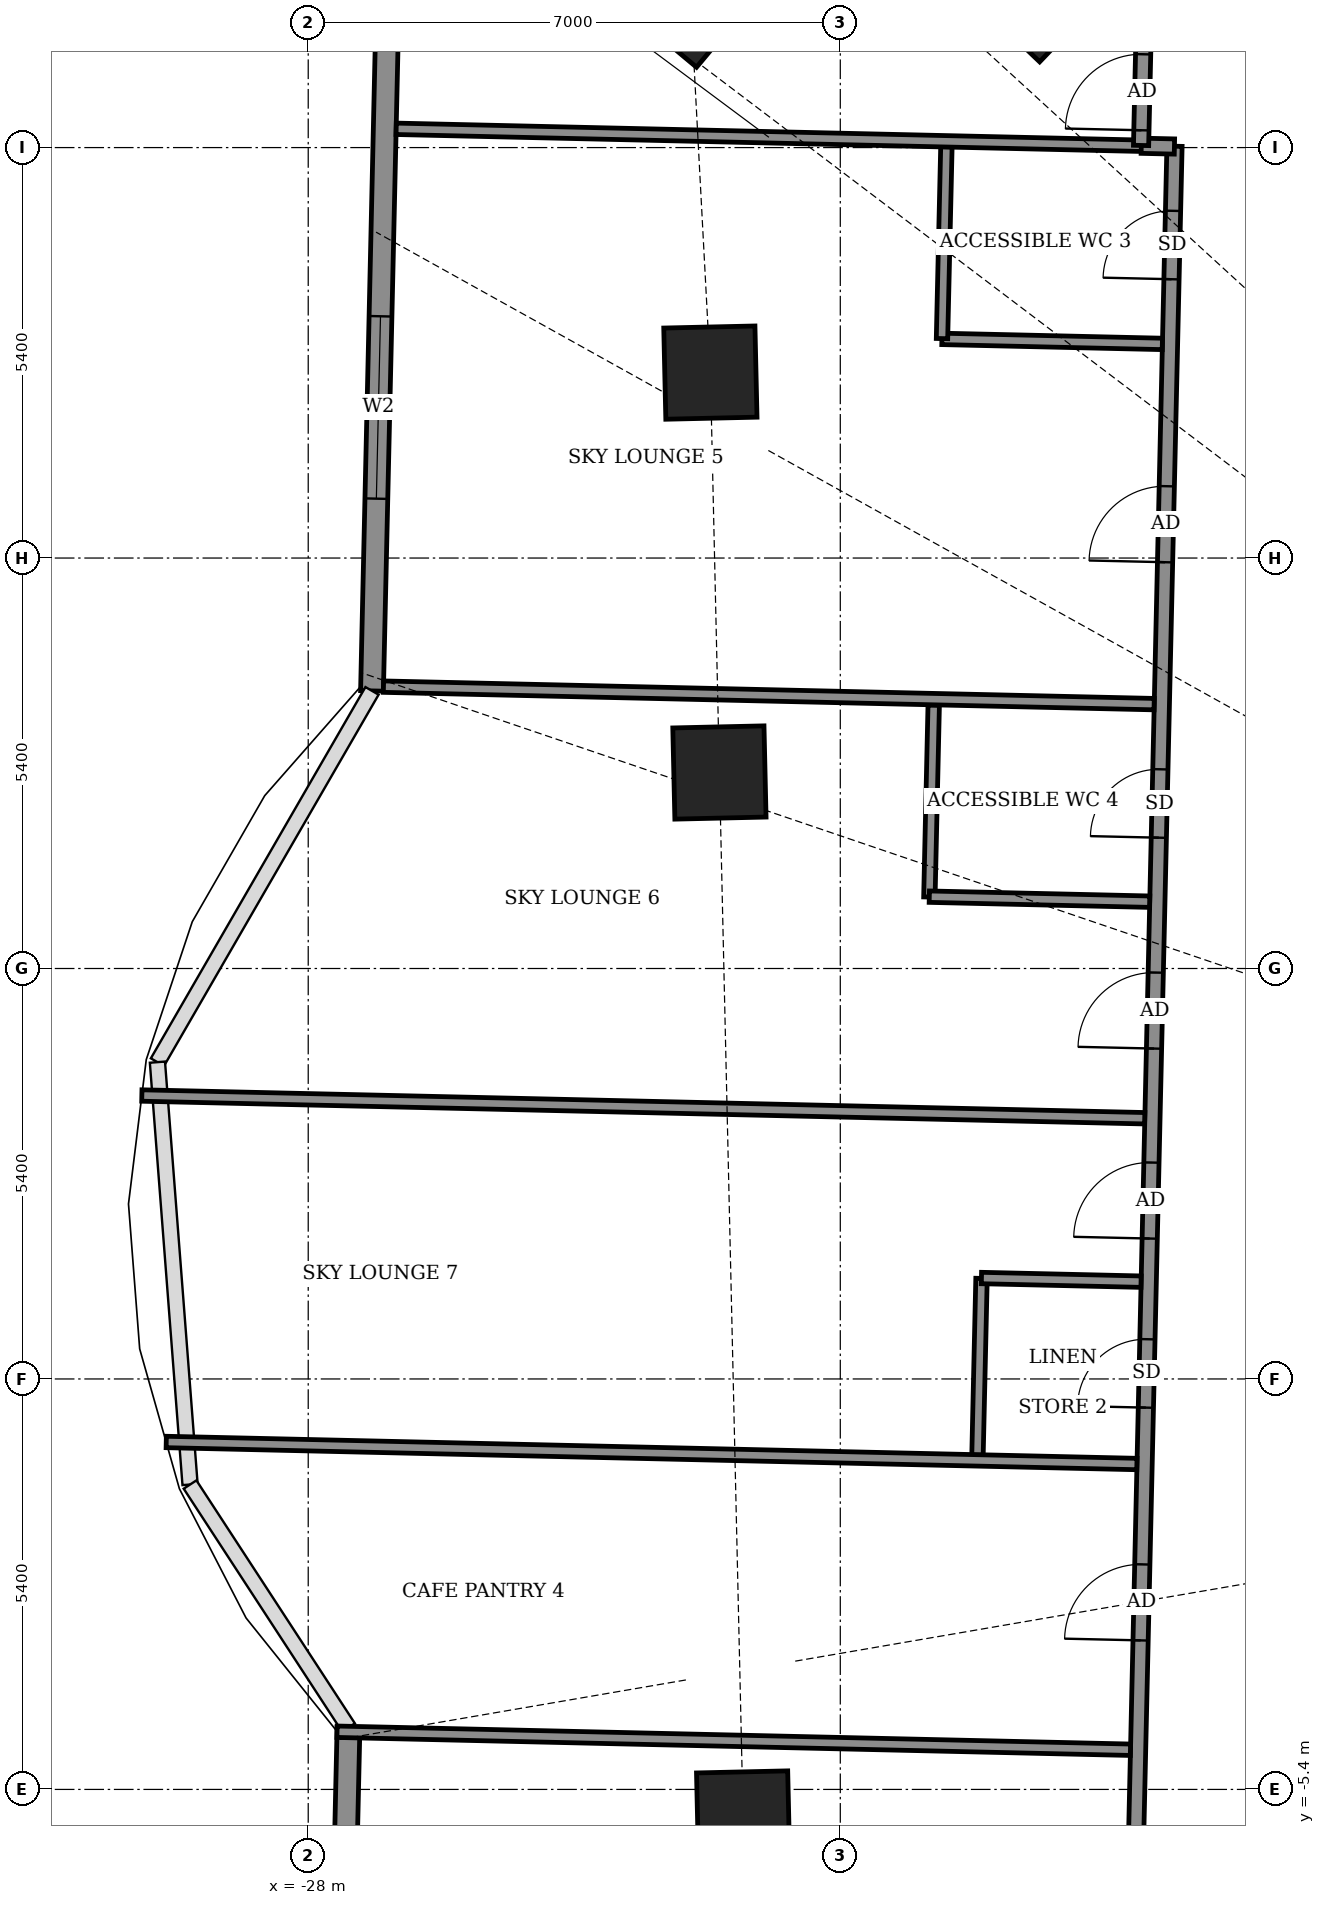
"""IFC4 building model, lengths in metres.
Left out: names, types, materials, properties, quantities, classifications, styles, units other than length and angle.
Written with IfcOpenShell. Run it as: python <this file> out.ifc"""

import sys

from ifc_helpers import new_model, si_unit, direction, frame, frame_2d, origin, origin_2d, place, context, subcontext, project, spatial, rectangle, extrude, element, fill, save


model = new_model("IFC4")
c1 = context("Model", 3, precision=1e-05, world=origin(), true_north=direction((0.0, 1.0)))
c2 = subcontext(c1, "Body", "Model", "MODEL_VIEW")
j1 = project(units=[si_unit("LENGTHUNIT", "METRE"), si_unit("PLANEANGLEUNIT", "RADIAN")], contexts=[c1])
p1 = place(None, origin())
s1 = spatial("IfcSite", under=j1, at=p1, CompositionType="ELEMENT")
p2 = place(p1, origin())
s2 = spatial("IfcBuilding", under=s1, at=p2, CompositionType="ELEMENT")
p3 = place(p2, frame((0.0, 0.0, 193.3)))
s3 = spatial("IfcBuildingStorey", under=s2, at=p3, CompositionType="ELEMENT", Elevation=193.3)
for number, where, z_axis, x_axis in (
    (1, (-22.278, -5.769, -0.55), (0.0, 0.0, 1.0), (0.023, -1.0, 0.0)),
    (2, (-18.396, 18.177, -0.55), (0.0, 0.0, 1.0), (-0.691, -0.723, 0.0)),
    (3, (-22.968, 18.103, -0.55), (0.0, 0.0, 1.0), (-0.641, -0.768, 0.0)),
    (4, (-22.709, 13.24, -0.55), (0.0, 0.0, 1.0), (0.023, -1.0, 0.0)),
    (5, (-22.59, 7.979, -0.55), (0.0, 0.0, 1.0), (0.023, -1.0, 0.0)),
):
    element("IfcColumn", number, at=place(p3, frame(where, z_axis=z_axis, x_axis=x_axis)), inside=s3, PredefinedType="COLUMN", context=c2, shape_type="SweptSolid", body=[
        extrude(rectangle(XDim=1.2, YDim=1.2, at=origin_2d()), origin(), (0.0, 0.0, 1.0), 4.6),
    ])
p4 = place(p3, frame((-26.904, 20.379, 0.0), z_axis=(0.0, 0.0, 1.0), x_axis=(-0.022669030322, -0.999743024514, 0.0)))
e6 = element("IfcWall", 6, at=p4, inside=s3, PredefinedType="SOLIDWALL", context=c2, shape_type="SweptSolid", body=[
    extrude(rectangle(XDim=11.33, YDim=0.3, at=frame_2d((5.665, 0.0))), origin(), (0.0, 0.0, 1.0), 2.85),
])
p5 = place(p4, frame((1.138, 0.0, 0.0)))
e7 = element("IfcOpeningElement", 7, at=p5, cuts=e6, PredefinedType="OPENING", context=c2, shape_type="SweptSolid", body=[
    extrude(rectangle(XDim=1.5, YDim=2.4, at=frame_2d((0.75, 1.2))), frame((0.0, 0.16, 0.0), z_axis=(0.0, -1.0, 0.0), x_axis=(1.0, 0.0, 0.0)), (0.0, 0.0, 1.0), 0.32),
])
p6 = place(p4, frame((6.4, 0.0, 0.9)))
e8 = element("IfcOpeningElement", 8, at=p6, cuts=e6, PredefinedType="OPENING", context=c2, shape_type="SweptSolid", body=[
    extrude(rectangle(XDim=2.4, YDim=1.5, at=frame_2d((1.2, 0.75))), frame((0.0, 0.16, 0.0), z_axis=(0.0, -1.0, 0.0), x_axis=(1.0, 0.0, 0.0)), (0.0, 0.0, 1.0), 0.32),
])
p7 = place(p3, frame((-27.47, -4.585, 0.0), z_axis=(0.0, 0.0, 1.0), x_axis=(-0.022686419344, -0.999742630069, 0.0)))
e9 = element("IfcWall", 9, at=p7, inside=s3, PredefinedType="SOLIDWALL", context=c2, shape_type="SweptSolid", body=[
    extrude(rectangle(XDim=11.73, YDim=0.3, at=frame_2d((5.865, 0.0))), origin(), (0.0, 0.0, 1.0), 2.85),
])
p8 = place(p7, frame((2.942, 0.0, 0.0)))
e10 = element("IfcOpeningElement", 10, at=p8, cuts=e9, PredefinedType="OPENING", context=c2, shape_type="SweptSolid", body=[
    extrude(rectangle(XDim=1.5, YDim=2.4, at=frame_2d((0.75, 1.2))), frame((0.0, 0.16, 0.0), z_axis=(0.0, -1.0, 0.0), x_axis=(1.0, 0.0, 0.0)), (0.0, 0.0, 1.0), 0.32),
])
p9 = place(p7, frame((7.629, 0.0, 0.9)))
e11 = element("IfcOpeningElement", 11, at=p9, cuts=e9, PredefinedType="OPENING", context=c2, shape_type="SweptSolid", body=[
    extrude(rectangle(XDim=0.9, YDim=1.5, at=frame_2d((0.45, 0.75))), frame((0.0, 0.16, 0.0), z_axis=(0.0, -1.0, 0.0), x_axis=(1.0, 0.0, 0.0)), (0.0, 0.0, 1.0), 0.32),
])
p10 = place(p7, frame((9.151, 0.0, 0.9)))
e12 = element("IfcOpeningElement", 12, at=p10, cuts=e9, PredefinedType="OPENING", context=c2, shape_type="SweptSolid", body=[
    extrude(rectangle(XDim=1.2, YDim=1.5, at=frame_2d((0.6, 0.75))), frame((0.0, 0.16, 0.0), z_axis=(0.0, -1.0, 0.0), x_axis=(1.0, 0.0, 0.0)), (0.0, 0.0, 1.0), 0.32),
])
p11 = place(p3, frame((-17.247, -12.149, 0.0), z_axis=(0.0, 0.0, 1.0), x_axis=(0.022698146637, 0.999742363881, 0.0)))
e13 = element("IfcWall", 13, at=p11, inside=s3, PredefinedType="PARTITIONING", context=c2, shape_type="SweptSolid", body=[
    extrude(rectangle(XDim=28.374, YDim=0.2, at=frame_2d((14.187, 0.0))), origin(), (0.0, 0.0, 1.0), 2.85),
])
p12 = place(p11, frame((22.9, 0.0, 0.0)))
e14 = element("IfcOpeningElement", 14, at=p12, cuts=e13, PredefinedType="OPENING", context=c2, shape_type="SweptSolid", body=[
    extrude(rectangle(XDim=1.0, YDim=2.1, at=frame_2d((0.5, 1.05))), frame((0.0, 0.11, 0.0), z_axis=(0.0, -1.0, 0.0), x_axis=(1.0, 0.0, 0.0)), (0.0, 0.0, 1.0), 0.22),
])
p13 = place(p11, frame((26.624, 0.0, 0.0)))
e15 = element("IfcOpeningElement", 15, at=p13, cuts=e13, PredefinedType="OPENING", context=c2, shape_type="SweptSolid", body=[
    extrude(rectangle(XDim=0.9, YDim=2.1, at=frame_2d((0.45, 1.05))), frame((0.0, 0.11, 0.0), z_axis=(0.0, -1.0, 0.0), x_axis=(1.0, 0.0, 0.0)), (0.0, 0.0, 1.0), 0.22),
])
p14 = place(p11, frame((16.5, 0.0, 0.0)))
e16 = element("IfcOpeningElement", 16, at=p14, cuts=e13, PredefinedType="OPENING", context=c2, shape_type="SweptSolid", body=[
    extrude(rectangle(XDim=1.0, YDim=2.1, at=frame_2d((0.5, 1.05))), frame((0.0, 0.11, 0.0), z_axis=(0.0, -1.0, 0.0), x_axis=(1.0, 0.0, 0.0)), (0.0, 0.0, 1.0), 0.22),
])
p15 = place(p11, frame((19.275, 0.0, 0.0)))
e17 = element("IfcOpeningElement", 17, at=p15, cuts=e13, PredefinedType="OPENING", context=c2, shape_type="SweptSolid", body=[
    extrude(rectangle(XDim=0.9, YDim=2.1, at=frame_2d((0.45, 1.05))), frame((0.0, 0.11, 0.0), z_axis=(0.0, -1.0, 0.0), x_axis=(1.0, 0.0, 0.0)), (0.0, 0.0, 1.0), 0.22),
])
p16 = place(p11, frame((14.0, 0.0, 0.0)))
e18 = element("IfcOpeningElement", 18, at=p16, cuts=e13, PredefinedType="OPENING", context=c2, shape_type="SweptSolid", body=[
    extrude(rectangle(XDim=1.0, YDim=2.1, at=frame_2d((0.5, 1.05))), frame((0.0, 0.11, 0.0), z_axis=(0.0, -1.0, 0.0), x_axis=(1.0, 0.0, 0.0)), (0.0, 0.0, 1.0), 0.22),
])
p17 = place(p11, frame((11.775, 0.0, 0.0)))
e19 = element("IfcOpeningElement", 19, at=p17, cuts=e13, PredefinedType="OPENING", context=c2, shape_type="SweptSolid", body=[
    extrude(rectangle(XDim=0.9, YDim=2.1, at=frame_2d((0.45, 1.05))), frame((0.0, 0.11, 0.0), z_axis=(0.0, -1.0, 0.0), x_axis=(1.0, 0.0, 0.0)), (0.0, 0.0, 1.0), 0.22),
])
p18 = place(p11, frame((8.712, 0.0, 0.0)))
e20 = element("IfcOpeningElement", 20, at=p18, cuts=e13, PredefinedType="OPENING", context=c2, shape_type="SweptSolid", body=[
    extrude(rectangle(XDim=1.0, YDim=2.1, at=frame_2d((0.5, 1.05))), frame((0.0, 0.11, 0.0), z_axis=(0.0, -1.0, 0.0), x_axis=(1.0, 0.0, 0.0)), (0.0, 0.0, 1.0), 0.22),
])
p19 = place(p11, frame((3.138, 0.0, 0.0)))
e21 = element("IfcOpeningElement", 21, at=p19, cuts=e13, PredefinedType="OPENING", context=c2, shape_type="SweptSolid", body=[
    extrude(rectangle(XDim=1.0, YDim=2.1, at=frame_2d((0.5, 1.05))), frame((0.0, 0.11, 0.0), z_axis=(0.0, -1.0, 0.0), x_axis=(1.0, 0.0, 0.0)), (0.0, 0.0, 1.0), 0.22),
])
p20 = place(p3, frame((-27.621, -4.641, 0.0), z_axis=(0.0, 0.0, 1.0), x_axis=(0.999742728106, -0.022682098664, 0.0)))
e22 = element("IfcWall", 22, at=p20, inside=s3, PredefinedType="PARTITIONING", context=c2, shape_type="SweptSolid", body=[
    extrude(rectangle(XDim=10.441, YDim=0.15, at=frame_2d((5.22, 0.0))), origin(), (0.0, 0.0, 1.0), 2.65),
])
p21 = place(p3, frame((-19.195, -1.002, 0.0), z_axis=(0.0, 0.0, 1.0), x_axis=(0.022781023197, 0.999740478815, 0.0)))
e23 = element("IfcWall", 23, at=p21, inside=s3, PredefinedType="PARTITIONING", context=c2, shape_type="SweptSolid", body=[
    extrude(rectangle(XDim=2.325, YDim=0.15, at=frame_2d((1.163, 0.0))), origin(), (0.0, 0.0, 1.0), 4.05),
])
p22 = place(p3, frame((-29.868, -0.829, 0.0), z_axis=(0.0, 0.0, 1.0), x_axis=(0.999742604636, -0.022687540085, 0.0)))
e24 = element("IfcWall", 24, at=p22, inside=s3, PredefinedType="PARTITIONING", context=c2, shape_type="SweptSolid", body=[
    extrude(rectangle(XDim=12.773, YDim=0.15, at=frame_2d((6.387, 0.0))), origin(), (0.0, 0.0, 1.0), 0.93),
])
p23 = place(p3, frame((-19.143, 1.328, 0.0), z_axis=(0.0, 0.0, 1.0), x_axis=(0.999740513837, -0.022779486249, 0.0)))
e25 = element("IfcWall", 25, at=p23, inside=s3, PredefinedType="PARTITIONING", context=c2, shape_type="SweptSolid", body=[
    extrude(rectangle(XDim=2.101, YDim=0.15, at=frame_2d((1.05, 0.0))), origin(), (0.0, 0.0, 1.0), 4.05),
])
p24 = place(p3, frame((-30.189, 3.729, 0.0), z_axis=(0.0, 0.0, 1.0), x_axis=(0.999743189939, -0.022661733609, 0.0)))
e26 = element("IfcWall", 26, at=p24, inside=s3, PredefinedType="PARTITIONING", context=c2, shape_type="SweptSolid", body=[
    extrude(rectangle(XDim=13.197, YDim=0.15, at=frame_2d((6.599, 0.0))), origin(), (0.0, 0.0, 1.0), 0.93),
])
p25 = place(p3, frame((-19.828, 6.34, 0.0), z_axis=(0.0, 0.0, 1.0), x_axis=(0.022532486354, 0.9997461113, 0.0)))
e27 = element("IfcWall", 27, at=p25, inside=s3, PredefinedType="PARTITIONING", context=c2, shape_type="SweptSolid", body=[
    extrude(rectangle(XDim=2.525, YDim=0.15, at=frame_2d((1.262, 0.0))), origin(), (0.0, 0.0, 1.0), 2.85),
])
p26 = place(p3, frame((-19.829, 6.345, 0.0), z_axis=(0.0, 0.0, 1.0), x_axis=(0.999741618182, -0.022730967319, 0.0)))
e28 = element("IfcWall", 28, at=p26, inside=s3, PredefinedType="PARTITIONING", context=c2, shape_type="SweptSolid", body=[
    extrude(rectangle(XDim=2.9, YDim=0.15, at=frame_2d((1.45, 0.0))), origin(), (0.0, 0.0, 1.0), 2.85),
])
p27 = place(p3, frame((-27.01, 9.108, 0.0), z_axis=(0.0, 0.0, 1.0), x_axis=(0.999742841246, -0.022677111331, 0.0)))
e29 = element("IfcWall", 29, at=p27, inside=s3, PredefinedType="PARTITIONING", context=c2, shape_type="SweptSolid", body=[
    extrude(rectangle(XDim=10.142, YDim=0.15, at=frame_2d((5.071, 0.0))), origin(), (0.0, 0.0, 1.0), 2.65),
])
p28 = place(p3, frame((-19.663, 13.683, 0.0), z_axis=(0.0, 0.0, 1.0), x_axis=(0.999739876649, -0.022807433839, 0.0)))
e30 = element("IfcWall", 30, at=p28, inside=s3, PredefinedType="PARTITIONING", context=c2, shape_type="SweptSolid", body=[
    extrude(rectangle(XDim=2.901, YDim=0.15, at=frame_2d((1.45, 0.0))), origin(), (0.0, 0.0, 1.0), 2.85),
])
p29 = place(p3, frame((-19.662, 13.687, 0.0), z_axis=(0.0, 0.0, 1.0), x_axis=(0.023015762656, 0.999735102249, 0.0)))
e31 = element("IfcWall", 31, at=p29, inside=s3, PredefinedType="PARTITIONING", context=c2, shape_type="SweptSolid", body=[
    extrude(rectangle(XDim=2.525, YDim=0.15, at=frame_2d((1.262, 0.0))), origin(), (0.0, 0.0, 1.0), 2.85),
])
p30 = place(p3, frame((-26.843, 16.447, 0.0), z_axis=(0.0, 0.0, 1.0), x_axis=(0.999741809847, -0.022722536032, 0.0)))
e32 = element("IfcWall", 32, at=p30, inside=s3, PredefinedType="PARTITIONING", context=c2, shape_type="SweptSolid", body=[
    extrude(rectangle(XDim=9.81, YDim=0.15, at=frame_2d((4.905, 0.0))), origin(), (0.0, 0.0, 1.0), 2.65),
])
p31 = place(p3, frame((-17.04, 16.224, 0.0), z_axis=(0.0, 0.0, 1.0), x_axis=(0.999736607625, -0.022950280466, 0.0)))
e33 = element("IfcWall", 33, at=p31, inside=s3, PredefinedType="PARTITIONING", context=c2, shape_type="SweptSolid", body=[
    extrude(rectangle(XDim=0.436, YDim=0.2, at=frame_2d((0.218, 0.0))), origin(), (0.0, 0.0, 1.0), 2.85),
])
p32 = place(p3, frame((-17.043, 16.228, 0.0), z_axis=(0.0, 0.0, 1.0), x_axis=(0.022617910375, 0.999744182344, 0.0)))
e34 = element("IfcWall", 34, at=p32, inside=s3, PredefinedType="PARTITIONING", context=c2, shape_type="SweptSolid", body=[
    extrude(rectangle(XDim=1.5, YDim=0.2, at=frame_2d((0.75, 0.0))), origin(), (0.0, 0.0, 1.0), 2.85),
])
p33 = place(p32, frame((0.2, 0.0, 0.0)))
e35 = element("IfcOpeningElement", 35, at=p33, cuts=e34, PredefinedType="OPENING", context=c2, shape_type="SweptSolid", body=[
    extrude(rectangle(XDim=1.0, YDim=2.1, at=frame_2d((0.5, 1.05))), frame((0.0, 0.11, 0.0), z_axis=(0.0, -1.0, 0.0), x_axis=(1.0, 0.0, 0.0)), (0.0, 0.0, 1.0), 0.22),
])
p34 = place(p6, origin())
e36 = element("IfcWindow", 36, at=p34, inside=s3, PartitioningType="DOUBLE_PANEL_VERTICAL", PredefinedType="WINDOW", context=c2, shape_type="SweptSolid", body=[
    extrude(rectangle(XDim=2.4, YDim=1.5, at=frame_2d((1.2, 0.75))), frame((0.0, 0.03, 0.0), z_axis=(0.0, -1.0, 0.0), x_axis=(1.0, 0.0, 0.0)), (0.0, 0.0, 1.0), 0.06),
])
fill(e8, e36)
p35 = place(p33, origin())
e37 = element("IfcDoor", 37, at=p35, inside=s3, OperationType="SINGLE_SWING_LEFT", PredefinedType="DOOR", context=c2, shape_type="SweptSolid", body=[
    extrude(rectangle(XDim=1.0, YDim=2.1, at=frame_2d((0.5, 1.05))), frame((0.0, 0.025, 0.0), z_axis=(0.0, -1.0, 0.0), x_axis=(1.0, 0.0, 0.0)), (0.0, 0.0, 1.0), 0.05),
])
fill(e35, e37)
p36 = place(p12, origin())
e38 = element("IfcDoor", 38, at=p36, inside=s3, OperationType="SINGLE_SWING_RIGHT", PredefinedType="DOOR", context=c2, shape_type="SweptSolid", body=[
    extrude(rectangle(XDim=1.0, YDim=2.1, at=frame_2d((0.5, 1.05))), frame((0.0, 0.025, 0.0), z_axis=(0.0, -1.0, 0.0), x_axis=(1.0, 0.0, 0.0)), (0.0, 0.0, 1.0), 0.05),
])
fill(e14, e38)
p37 = place(p13, origin())
e39 = element("IfcDoor", 39, at=p37, inside=s3, OperationType="SINGLE_SWING_LEFT", PredefinedType="DOOR", context=c2, shape_type="SweptSolid", body=[
    extrude(rectangle(XDim=0.9, YDim=2.1, at=frame_2d((0.45, 1.05))), frame((0.0, 0.025, 0.0), z_axis=(0.0, -1.0, 0.0), x_axis=(1.0, 0.0, 0.0)), (0.0, 0.0, 1.0), 0.05),
])
fill(e15, e39)
p38 = place(p14, origin())
e40 = element("IfcDoor", 40, at=p38, inside=s3, OperationType="SINGLE_SWING_LEFT", PredefinedType="DOOR", context=c2, shape_type="SweptSolid", body=[
    extrude(rectangle(XDim=1.0, YDim=2.1, at=frame_2d((0.5, 1.05))), frame((0.0, 0.025, 0.0), z_axis=(0.0, -1.0, 0.0), x_axis=(1.0, 0.0, 0.0)), (0.0, 0.0, 1.0), 0.05),
])
fill(e16, e40)
p39 = place(p15, origin())
e41 = element("IfcDoor", 41, at=p39, inside=s3, OperationType="SINGLE_SWING_RIGHT", PredefinedType="DOOR", context=c2, shape_type="SweptSolid", body=[
    extrude(rectangle(XDim=0.9, YDim=2.1, at=frame_2d((0.45, 1.05))), frame((0.0, 0.025, 0.0), z_axis=(0.0, -1.0, 0.0), x_axis=(1.0, 0.0, 0.0)), (0.0, 0.0, 1.0), 0.05),
])
fill(e17, e41)
p40 = place(p16, origin())
e42 = element("IfcDoor", 42, at=p40, inside=s3, OperationType="SINGLE_SWING_RIGHT", PredefinedType="DOOR", context=c2, shape_type="SweptSolid", body=[
    extrude(rectangle(XDim=1.0, YDim=2.1, at=frame_2d((0.5, 1.05))), frame((0.0, 0.025, 0.0), z_axis=(0.0, -1.0, 0.0), x_axis=(1.0, 0.0, 0.0)), (0.0, 0.0, 1.0), 0.05),
])
fill(e18, e42)
p41 = place(p17, origin())
e43 = element("IfcDoor", 43, at=p41, inside=s3, OperationType="SINGLE_SWING_LEFT", PredefinedType="DOOR", context=c2, shape_type="SweptSolid", body=[
    extrude(rectangle(XDim=0.9, YDim=2.1, at=frame_2d((0.45, 1.05))), frame((0.0, 0.025, 0.0), z_axis=(0.0, -1.0, 0.0), x_axis=(1.0, 0.0, 0.0)), (0.0, 0.0, 1.0), 0.05),
])
fill(e19, e43)
p42 = place(p18, origin())
e44 = element("IfcDoor", 44, at=p42, inside=s3, OperationType="SINGLE_SWING_LEFT", PredefinedType="DOOR", context=c2, shape_type="SweptSolid", body=[
    extrude(rectangle(XDim=1.0, YDim=2.1, at=frame_2d((0.5, 1.05))), frame((0.0, 0.025, 0.0), z_axis=(0.0, -1.0, 0.0), x_axis=(1.0, 0.0, 0.0)), (0.0, 0.0, 1.0), 0.05),
])
fill(e20, e44)
save(model, sys.argv[1])
